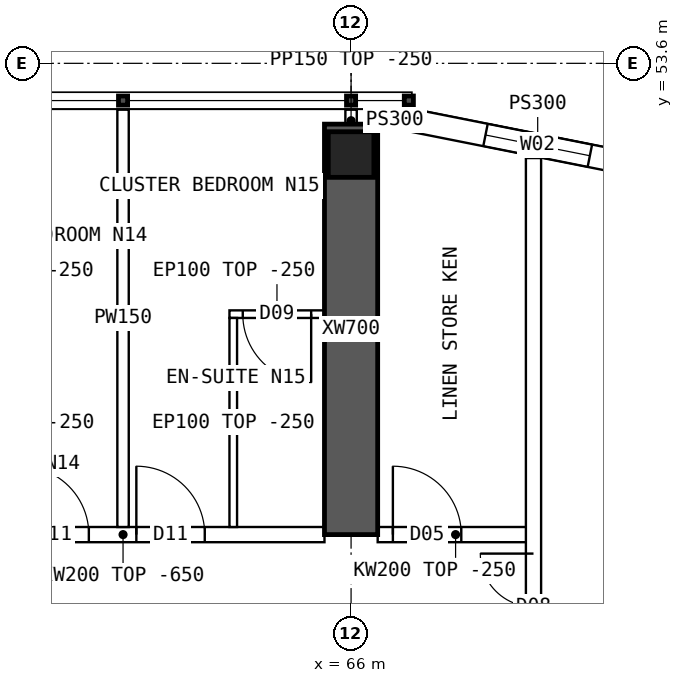
"""IFC4 building model, lengths in metres.
Left out: names, types, materials, properties, quantities, classifications, styles, units other than length and angle.
Written with IfcOpenShell. Run it as: python <this file> out.ifc"""

import sys

from ifc_helpers import new_model, si_unit, direction, frame, frame_2d, origin, origin_2d, place, context, subcontext, project, spatial, polyline, rectangle, hollow_rectangle, outline, extrude, element, fill, save


model = new_model("IFC4")
c1 = context("Model", 3, precision=1e-05, world=origin(), true_north=direction((0.0, 1.0)))
c2 = subcontext(c1, "Body", "Model", "MODEL_VIEW")
j1 = project(units=[si_unit("LENGTHUNIT", "METRE"), si_unit("PLANEANGLEUNIT", "RADIAN")], contexts=[c1])
p1 = place(None, origin())
s1 = spatial("IfcSite", under=j1, at=p1, CompositionType="ELEMENT")
p2 = place(p1, origin())
s2 = spatial("IfcBuilding", under=s1, at=p2, CompositionType="ELEMENT")
p3 = place(p2, frame((0.0, 0.0, 239.05)))
s3 = spatial("IfcBuildingStorey", under=s2, at=p3, CompositionType="ELEMENT", Elevation=239.05)
p4 = place(p3, frame((66.0, 52.4, 0.0), z_axis=(0.0, 0.0, 1.0), x_axis=(1.0, 0.0, 0.0)))
e1 = element("IfcColumn", 1, at=p4, inside=s3, PredefinedType="COLUMN", context=c2, shape_type="SweptSolid", body=[
    extrude(hollow_rectangle(XDim=0.6, YDim=0.6, WallThickness=0.06, at=origin_2d()), origin(), (0.0, 0.0, 1.0), 3.75),
])
p5 = place(p3, frame((66.0, 47.4, 0.0), z_axis=(0.0, 0.0, 1.0), x_axis=(0.0, 1.0, 0.0)))
e2 = element("IfcWall", 2, at=p5, inside=s3, PredefinedType="SHEAR", context=c2, shape_type="SweptSolid", body=[
    extrude(rectangle(XDim=5.4, YDim=0.7, at=frame_2d((2.7, 0.0))), origin(), (0.0, 0.0, 1.0), 3.75),
])
p6 = place(p3, frame((70.11, 52.192, 0.0), z_axis=(0.0, 0.0, 1.0), x_axis=(-0.98078325777, 0.195100490205, 0.0)))
e3 = element("IfcWall", 3, at=p6, inside=s3, PredefinedType="SOLIDWALL", context=c2, shape_type="SweptSolid", body=[
    extrude(outline(polyline([(-0.03, -0.15), (3.405, -0.15), (3.345, 0.15), (0.03, 0.15), (-0.03, -0.15)])), origin(), (0.0, 0.0, 1.0), 3.5),
])
p7 = place(p6, frame((0.988, 0.0, 0.9)))
e4 = element("IfcOpeningElement", 4, at=p7, cuts=e3, PredefinedType="OPENING", context=c2, shape_type="SweptSolid", body=[
    extrude(rectangle(XDim=1.4, YDim=1.8, at=frame_2d((0.7, 0.9))), frame((0.0, 0.16, 0.0), z_axis=(0.0, -1.0, 0.0), x_axis=(1.0, 0.0, 0.0)), (0.0, 0.0, 1.0), 0.32),
])
p8 = place(p3, frame((66.8, 52.85, 0.0), z_axis=(0.0, 0.0, 1.0), x_axis=(-1.0, 0.0, 0.0)))
e5 = element("IfcWall", 5, at=p8, inside=s3, PredefinedType="SOLIDWALL", context=c2, shape_type="SweptSolid", body=[
    extrude(rectangle(XDim=0.45, YDim=0.3, at=frame_2d((0.225, 0.0))), origin(), (0.0, 0.0, 1.0), 3.5),
])
p9 = place(p3, frame((60.35, 47.4, 0.0), z_axis=(0.0, 0.0, 1.0), x_axis=(1.0, 0.0, 0.0)))
e6 = element("IfcWall", 6, at=p9, inside=s3, PredefinedType="SOLIDWALL", context=c2, shape_type="SweptSolid", body=[
    extrude(outline(polyline([(0.0, 0.0), (5.3, 0.0), (5.3, 3.1), (0.0, 3.1), (0.0, 0.0)])), frame((0.0, 0.1, 0.0), z_axis=(0.0, -1.0, 0.0), x_axis=(1.0, 0.0, 0.0)), (0.0, 0.0, 1.0), 0.2),
])
p10 = place(p9, frame((1.3, 0.0, 0.0)))
e7 = element("IfcOpeningElement", 7, at=p10, cuts=e6, PredefinedType="OPENING", context=c2, shape_type="SweptSolid", body=[
    extrude(rectangle(XDim=0.9, YDim=2.1, at=frame_2d((0.45, 1.05))), frame((0.0, 0.11, 0.0), z_axis=(0.0, -1.0, 0.0), x_axis=(1.0, 0.0, 0.0)), (0.0, 0.0, 1.0), 0.22),
])
p11 = place(p9, frame((2.825, 0.0, 0.0)))
e8 = element("IfcOpeningElement", 8, at=p11, cuts=e6, PredefinedType="OPENING", context=c2, shape_type="SweptSolid", body=[
    extrude(rectangle(XDim=0.9, YDim=2.1, at=frame_2d((0.45, 1.05))), frame((0.0, 0.11, 0.0), z_axis=(0.0, -1.0, 0.0), x_axis=(1.0, 0.0, 0.0)), (0.0, 0.0, 1.0), 0.22),
])
p12 = place(p3, frame((66.35, 47.4, 0.0), z_axis=(0.0, 0.0, 1.0), x_axis=(1.0, 0.0, 0.0)))
e9 = element("IfcWall", 9, at=p12, inside=s3, PredefinedType="SOLIDWALL", context=c2, shape_type="SweptSolid", body=[
    extrude(rectangle(XDim=2.05, YDim=0.2, at=frame_2d((1.025, 0.0))), origin(), (0.0, 0.0, 1.0), 3.5),
])
p13 = place(p12, frame((0.2, 0.0, 0.0)))
e10 = element("IfcOpeningElement", 10, at=p13, cuts=e9, PredefinedType="OPENING", context=c2, shape_type="SweptSolid", body=[
    extrude(rectangle(XDim=0.9, YDim=2.1, at=frame_2d((0.45, 1.05))), frame((0.0, 0.11, 0.0), z_axis=(0.0, -1.0, 0.0), x_axis=(1.0, 0.0, 0.0)), (0.0, 0.0, 1.0), 0.22),
])
p14 = place(p3, frame((63.0, 52.99, 0.0), z_axis=(0.0, 0.0, 1.0), x_axis=(0.0, -1.0, 0.0)))
e11 = element("IfcWall", 11, at=p14, inside=s3, PredefinedType="PARTITIONING", context=c2, shape_type="SweptSolid", body=[
    extrude(outline(polyline([(0.0, 0.0), (5.49, 0.0), (5.49, 3.1), (5.442, 3.1), (5.44, 3.5), (0.792, 3.5), (0.79, 3.1), (0.392, 3.1), (0.39, 3.5), (0.0, 3.5), (0.0, 0.0)])), frame((0.0, 0.075, 0.0), z_axis=(0.0, -1.0, 0.0), x_axis=(1.0, 0.0, 0.0)), (0.0, 0.0, 1.0), 0.15),
])
p15 = place(p3, frame((64.4, 50.3, 0.0), z_axis=(0.0, 0.0, 1.0), x_axis=(1.0, 0.0, 0.0)))
e12 = element("IfcWall", 12, at=p15, inside=s3, PredefinedType="PARTITIONING", context=c2, shape_type="SweptSolid", body=[
    extrude(rectangle(XDim=1.25, YDim=0.1, at=frame_2d((0.625, 0.0))), origin(), (0.0, 0.0, 1.0), 3.5),
])
p16 = place(p15, frame((0.175, 0.0, 0.0)))
e13 = element("IfcOpeningElement", 13, at=p16, cuts=e12, PredefinedType="OPENING", context=c2, shape_type="SweptSolid", body=[
    extrude(rectangle(XDim=0.9, YDim=2.1, at=frame_2d((0.45, 1.05))), frame((0.0, 0.06, 0.0), z_axis=(0.0, -1.0, 0.0), x_axis=(1.0, 0.0, 0.0)), (0.0, 0.0, 1.0), 0.12),
])
p17 = place(p3, frame((64.45, 50.25, 0.0), z_axis=(0.0, 0.0, 1.0), x_axis=(0.0, -1.0, 0.0)))
e14 = element("IfcWall", 14, at=p17, inside=s3, PredefinedType="PARTITIONING", context=c2, shape_type="SweptSolid", body=[
    extrude(outline(polyline([(0.0, 0.0), (2.75, 0.0), (2.75, 3.1), (2.702, 3.1), (2.7, 3.5), (0.0, 3.5), (0.0, 0.0)])), frame((0.0, 0.05, 0.0), z_axis=(0.0, -1.0, 0.0), x_axis=(1.0, 0.0, 0.0)), (0.0, 0.0, 1.0), 0.1),
])
p18 = place(p3, frame((68.4, 11.646, 0.0), z_axis=(0.0, 0.0, 1.0), x_axis=(0.0, 1.0, 0.0)))
e15 = element("IfcWall", 15, at=p18, inside=s3, PredefinedType="SOLIDWALL", context=c2, shape_type="SweptSolid", body=[
    extrude(rectangle(XDim=40.708, YDim=0.2, at=frame_2d((20.354, 0.0))), origin(), (0.0, 0.0, 1.0), 3.5),
])
p19 = place(p18, frame((5.104, 0.0, 0.0)))
e16 = element("IfcOpeningElement", 16, at=p19, cuts=e15, PredefinedType="OPENING", context=c2, shape_type="SweptSolid", body=[
    extrude(rectangle(XDim=1.4, YDim=2.1, at=frame_2d((0.7, 1.05))), frame((0.0, 0.11, 0.0), z_axis=(0.0, -1.0, 0.0), x_axis=(1.0, 0.0, 0.0)), (0.0, 0.0, 1.0), 0.22),
])
p20 = place(p18, frame((34.104, 0.0, 0.0)))
e17 = element("IfcOpeningElement", 17, at=p20, cuts=e15, PredefinedType="OPENING", context=c2, shape_type="SweptSolid", body=[
    extrude(rectangle(XDim=1.4, YDim=2.1, at=frame_2d((0.7, 1.05))), frame((0.0, 0.11, 0.0), z_axis=(0.0, -1.0, 0.0), x_axis=(1.0, 0.0, 0.0)), (0.0, 0.0, 1.0), 0.22),
])
p21 = place(p3, frame((66.0, 52.7, 0.0), z_axis=(0.0, 0.0, 1.0), x_axis=(0.0, 1.0, 0.0)))
e18 = element("IfcWall", 18, at=p21, inside=s3, PredefinedType="PARTITIONING", context=c2, shape_type="SweptSolid", body=[
    extrude(rectangle(XDim=0.29, YDim=0.15, at=frame_2d((0.145, 0.0))), origin(), (0.0, 0.0, 1.0), 3.5),
])
p22 = place(p7, origin())
e19 = element("IfcWindow", 19, at=p22, inside=s3, PartitioningType="SINGLE_PANEL", PredefinedType="WINDOW", context=c2, shape_type="SweptSolid", body=[
    extrude(rectangle(XDim=1.4, YDim=1.8, at=frame_2d((0.7, 0.9))), frame((0.0, 0.03, 0.0), z_axis=(0.0, -1.0, 0.0), x_axis=(1.0, 0.0, 0.0)), (0.0, 0.0, 1.0), 0.06),
])
fill(e4, e19)
p23 = place(p10, origin())
e20 = element("IfcDoor", 20, at=p23, inside=s3, OperationType="SINGLE_SWING_LEFT", PredefinedType="DOOR", context=c2, shape_type="SweptSolid", body=[
    extrude(rectangle(XDim=0.9, YDim=2.1, at=frame_2d((0.45, 1.05))), frame((0.0, 0.025, 0.0), z_axis=(0.0, -1.0, 0.0), x_axis=(1.0, 0.0, 0.0)), (0.0, 0.0, 1.0), 0.05),
])
fill(e7, e20)
p24 = place(p16, origin())
e21 = element("IfcDoor", 21, at=p24, inside=s3, OperationType="SINGLE_SWING_RIGHT", PredefinedType="DOOR", context=c2, shape_type="SweptSolid", body=[
    extrude(rectangle(XDim=0.9, YDim=2.1, at=frame_2d((0.45, 1.05))), frame((0.0, 0.025, 0.0), z_axis=(0.0, -1.0, 0.0), x_axis=(1.0, 0.0, 0.0)), (0.0, 0.0, 1.0), 0.05),
])
fill(e13, e21)
p25 = place(p11, origin())
e22 = element("IfcDoor", 22, at=p25, inside=s3, OperationType="SINGLE_SWING_LEFT", PredefinedType="DOOR", context=c2, shape_type="SweptSolid", body=[
    extrude(rectangle(XDim=0.9, YDim=2.1, at=frame_2d((0.45, 1.05))), frame((0.0, 0.025, 0.0), z_axis=(0.0, -1.0, 0.0), x_axis=(1.0, 0.0, 0.0)), (0.0, 0.0, 1.0), 0.05),
])
fill(e8, e22)
p26 = place(p20, origin())
e23 = element("IfcDoor", 23, at=p26, inside=s3, OperationType="DOUBLE_DOOR_SINGLE_SWING", PredefinedType="DOOR", context=c2, shape_type="SweptSolid", body=[
    extrude(rectangle(XDim=1.4, YDim=2.1, at=frame_2d((0.7, 1.05))), frame((0.0, 0.025, 0.0), z_axis=(0.0, -1.0, 0.0), x_axis=(1.0, 0.0, 0.0)), (0.0, 0.0, 1.0), 0.05),
])
fill(e17, e23)
p27 = place(p13, origin())
e24 = element("IfcDoor", 24, at=p27, inside=s3, OperationType="SINGLE_SWING_LEFT", PredefinedType="DOOR", context=c2, shape_type="SweptSolid", body=[
    extrude(rectangle(XDim=0.9, YDim=2.1, at=frame_2d((0.45, 1.05))), frame((0.0, 0.025, 0.0), z_axis=(0.0, -1.0, 0.0), x_axis=(1.0, 0.0, 0.0)), (0.0, 0.0, 1.0), 0.05),
])
fill(e10, e24)
save(model, sys.argv[1])
